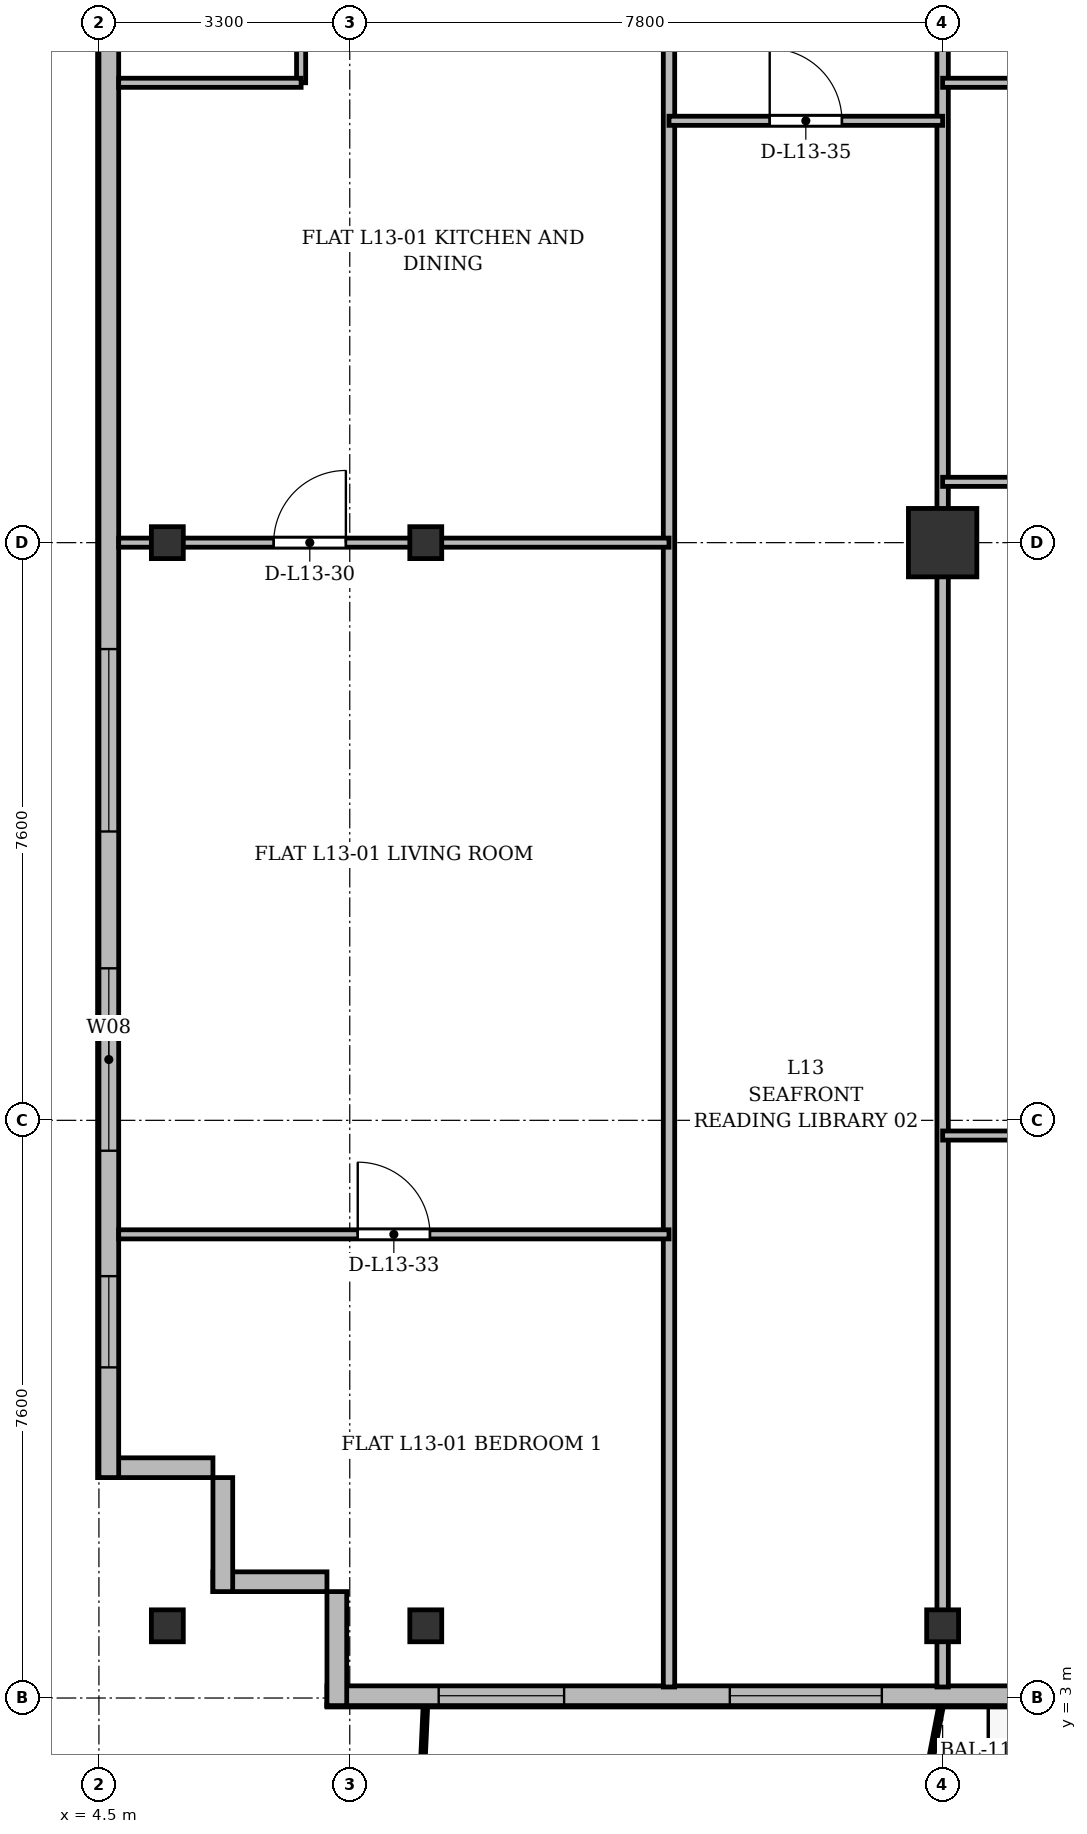
"""IFC4 building model, lengths in metres.
Left out: names, types, materials, properties, quantities, classifications, styles, units other than length and angle.
Written with IfcOpenShell. Run it as: python <this file> out.ifc"""

import sys

from ifc_helpers import new_model, si_unit, direction, frame, frame_2d, origin, origin_2d, place, context, subcontext, project, spatial, rectangle, i_section, extrude, source, transform, mapped, element, fill, save


model = new_model("IFC4")
c1 = context("Model", 3, precision=1e-05, world=origin(), true_north=direction((0.0, 1.0)))
c2 = subcontext(c1, "Body", "Model", "MODEL_VIEW")
j1 = project(units=[si_unit("LENGTHUNIT", "METRE"), si_unit("PLANEANGLEUNIT", "RADIAN")], contexts=[c1])
p1 = place(None, origin())
s1 = spatial("IfcSite", under=j1, at=p1, CompositionType="ELEMENT")
p2 = place(p1, origin())
s2 = spatial("IfcBuilding", under=s1, at=p2, CompositionType="ELEMENT")
p3 = place(p2, frame((0.0, 0.0, 52.3)))
s3 = spatial("IfcBuildingStorey", under=s2, at=p3, CompositionType="ELEMENT", Elevation=52.3)
m1 = source(origin(), c2, "Body", "SweptSolid", [
    extrude(i_section(OverallWidth=0.42, OverallDepth=0.42, WebThickness=0.026, FlangeThickness=0.04, at=origin_2d()), origin(), (0.0, 0.0, 1.0), 3.6),
])
for number, where, z_axis, x_axis in (
    (1, (5.4, 3.95, 0.0), (0.0, 0.0, 1.0), (1.0, 0.0, 0.0)),
    (2, (5.4, 18.2, 0.0), (0.0, 0.0, 1.0), (1.0, 0.0, 0.0)),
    (3, (8.8, 3.95, 0.0), (0.0, 0.0, 1.0), (1.0, 0.0, 0.0)),
    (4, (8.8, 18.2, 0.0), (0.0, 0.0, 1.0), (1.0, 0.0, 0.0)),
    (5, (15.6, 3.95, 0.0), (0.0, 0.0, 1.0), (1.0, 0.0, 0.0)),
):
    element("IfcColumn", number, at=place(p3, frame(where, z_axis=z_axis, x_axis=x_axis)), inside=s3, PredefinedType="COLUMN", context=c2, shape_type="MappedRepresentation", body=[
        mapped(m1, transform((0.0, 0.0, 0.0), x_axis=(1.0, 0.0, 0.0), y_axis=(0.0, 1.0, 0.0), z_axis=(0.0, 0.0, 1.0), scale=1.0)),
    ])
m2 = source(origin(), c2, "Body", "SweptSolid", [
    extrude(rectangle(XDim=0.9, YDim=0.9, at=origin_2d()), origin(), (0.0, 0.0, 1.0), 3.6),
])
p4 = place(p3, frame((15.6, 18.2, 0.0), z_axis=(0.0, 0.0, 1.0), x_axis=(1.0, 0.0, 0.0)))
e6 = element("IfcColumn", 6, at=p4, inside=s3, PredefinedType="COLUMN", context=c2, shape_type="MappedRepresentation", body=[
    mapped(m2, transform((0.0, 0.0, 0.0), x_axis=(1.0, 0.0, 0.0), y_axis=(0.0, 1.0, 0.0), z_axis=(0.0, 0.0, 1.0), scale=1.0)),
])
for number, where, z_axis, x_axis in (
    (7, (7.5, 4.53, 0.0), (0.0, 0.0, 1.0), (-1.0, 0.0, 0.0)),
    (8, (6.13, 4.4, 0.0), (0.0, 0.0, 1.0), (0.0, 1.0, 0.0)),
):
    element("IfcWall", number, at=place(p3, frame(where, z_axis=z_axis, x_axis=x_axis)), inside=s3, PredefinedType="SOLIDWALL", context=c2, shape_type="SweptSolid", body=[
        extrude(rectangle(XDim=1.5, YDim=0.26, at=frame_2d((0.75, 0.0))), origin(), (0.0, 0.0, 1.0), 3.34),
    ])
p5 = place(p3, frame((6.0, 6.03, 0.0), z_axis=(0.0, 0.0, 1.0), x_axis=(-1.0, 0.0, 0.0)))
e9 = element("IfcWall", 9, at=p5, inside=s3, PredefinedType="SOLIDWALL", context=c2, shape_type="SweptSolid", body=[
    extrude(rectangle(XDim=1.5, YDim=0.26, at=frame_2d((0.75, 0.0))), origin(), (0.0, 0.0, 1.0), 2.752),
])
p6 = place(p3, frame((4.63, 5.9, 0.0), z_axis=(0.0, 0.0, 1.0), x_axis=(0.0, 1.0, 0.0)))
e10 = element("IfcWall", 10, at=p6, inside=s3, PredefinedType="SOLIDWALL", context=c2, shape_type="SweptSolid", body=[
    extrude(rectangle(XDim=39.6, YDim=0.26, at=frame_2d((19.8, 0.0))), origin(), (0.0, 0.0, 1.0), 3.34),
])
p7 = place(p6, frame((1.45, 0.0, 0.92)))
e11 = element("IfcOpeningElement", 11, at=p7, cuts=e10, PredefinedType="OPENING", context=c2, shape_type="SweptSolid", body=[
    extrude(rectangle(XDim=1.2, YDim=1.65, at=frame_2d((0.6, 0.825))), frame((0.0, 0.14, 0.0), z_axis=(0.0, -1.0, 0.0), x_axis=(1.0, 0.0, 0.0)), (0.0, 0.0, 1.0), 0.28),
])
p8 = place(p6, frame((4.3, 0.0, 0.92)))
e12 = element("IfcOpeningElement", 12, at=p8, cuts=e10, PredefinedType="OPENING", context=c2, shape_type="SweptSolid", body=[
    extrude(rectangle(XDim=2.4, YDim=2.1, at=frame_2d((1.2, 1.05))), frame((0.0, 0.14, 0.0), z_axis=(0.0, -1.0, 0.0), x_axis=(1.0, 0.0, 0.0)), (0.0, 0.0, 1.0), 0.28),
])
p9 = place(p6, frame((8.5, 0.0, 0.92)))
e13 = element("IfcOpeningElement", 13, at=p9, cuts=e10, PredefinedType="OPENING", context=c2, shape_type="SweptSolid", body=[
    extrude(rectangle(XDim=2.4, YDim=2.1, at=frame_2d((1.2, 1.05))), frame((0.0, 0.14, 0.0), z_axis=(0.0, -1.0, 0.0), x_axis=(1.0, 0.0, 0.0)), (0.0, 0.0, 1.0), 0.28),
])
p10 = place(p6, frame((29.7, 0.0, 0.92)))
e14 = element("IfcOpeningElement", 14, at=p10, cuts=e10, PredefinedType="OPENING", context=c2, shape_type="SweptSolid", body=[
    extrude(rectangle(XDim=2.4, YDim=2.1, at=frame_2d((1.2, 1.05))), frame((0.0, 0.14, 0.0), z_axis=(0.0, -1.0, 0.0), x_axis=(1.0, 0.0, 0.0)), (0.0, 0.0, 1.0), 0.28),
])
p11 = place(p6, frame((33.9, 0.0, 0.92)))
e15 = element("IfcOpeningElement", 15, at=p11, cuts=e10, PredefinedType="OPENING", context=c2, shape_type="SweptSolid", body=[
    extrude(rectangle(XDim=1.2, YDim=1.65, at=frame_2d((0.6, 0.825))), frame((0.0, 0.14, 0.0), z_axis=(0.0, -1.0, 0.0), x_axis=(1.0, 0.0, 0.0)), (0.0, 0.0, 1.0), 0.28),
])
p12 = place(p6, frame((37.25, 0.0, 0.92)))
e16 = element("IfcOpeningElement", 16, at=p12, cuts=e10, PredefinedType="OPENING", context=c2, shape_type="SweptSolid", body=[
    extrude(rectangle(XDim=1.2, YDim=1.65, at=frame_2d((0.6, 0.825))), frame((0.0, 0.14, 0.0), z_axis=(0.0, -1.0, 0.0), x_axis=(1.0, 0.0, 0.0)), (0.0, 0.0, 1.0), 0.28),
])
p13 = place(p3, frame((66.9, 3.03, 0.0), z_axis=(0.0, 0.0, 1.0), x_axis=(-1.0, 0.0, 0.0)))
e17 = element("IfcWall", 17, at=p13, inside=s3, PredefinedType="SOLIDWALL", context=c2, shape_type="SweptSolid", body=[
    extrude(rectangle(XDim=59.4, YDim=0.26, at=frame_2d((29.7, 0.0))), origin(), (0.0, 0.0, 1.0), 3.34),
])
p14 = place(p13, frame((0.495, 0.0, 0.9)))
e18 = element("IfcOpeningElement", 18, at=p14, cuts=e17, PredefinedType="OPENING", context=c2, shape_type="SweptSolid", body=[
    extrude(rectangle(XDim=2.0, YDim=1.95, at=frame_2d((1.0, 0.975))), frame((0.0, 0.14, 0.0), z_axis=(0.0, -1.0, 0.0), x_axis=(1.0, 0.0, 0.0)), (0.0, 0.0, 1.0), 0.28),
])
p15 = place(p13, frame((4.675, 0.0, 0.9)))
e19 = element("IfcOpeningElement", 19, at=p15, cuts=e17, PredefinedType="OPENING", context=c2, shape_type="SweptSolid", body=[
    extrude(rectangle(XDim=1.65, YDim=1.85, at=frame_2d((0.825, 0.925))), frame((0.0, 0.14, 0.0), z_axis=(0.0, -1.0, 0.0), x_axis=(1.0, 0.0, 0.0)), (0.0, 0.0, 1.0), 0.28),
])
p16 = place(p13, frame((11.1, 0.0, 0.9)))
e20 = element("IfcOpeningElement", 20, at=p16, cuts=e17, PredefinedType="OPENING", context=c2, shape_type="SweptSolid", body=[
    extrude(rectangle(XDim=1.8, YDim=1.8, at=frame_2d((0.9, 0.9))), frame((0.0, 0.14, 0.0), z_axis=(0.0, -1.0, 0.0), x_axis=(1.0, 0.0, 0.0)), (0.0, 0.0, 1.0), 0.28),
])
p17 = place(p13, frame((17.007, 0.0, 0.0)))
e21 = element("IfcOpeningElement", 21, at=p17, cuts=e17, PredefinedType="OPENING", context=c2, shape_type="SweptSolid", body=[
    extrude(rectangle(XDim=1.2, YDim=2.2, at=frame_2d((0.6, 1.1))), frame((0.0, 0.14, 0.0), z_axis=(0.0, -1.0, 0.0), x_axis=(1.0, 0.0, 0.0)), (0.0, 0.0, 1.0), 0.28),
])
p18 = place(p13, frame((20.55, 0.0, 0.9)))
e22 = element("IfcOpeningElement", 22, at=p18, cuts=e17, PredefinedType="OPENING", context=c2, shape_type="SweptSolid", body=[
    extrude(rectangle(XDim=1.5, YDim=1.75, at=frame_2d((0.75, 0.875))), frame((0.0, 0.14, 0.0), z_axis=(0.0, -1.0, 0.0), x_axis=(1.0, 0.0, 0.0)), (0.0, 0.0, 1.0), 0.28),
])
p19 = place(p13, frame((24.5, 0.0, 0.9)))
e23 = element("IfcOpeningElement", 23, at=p19, cuts=e17, PredefinedType="OPENING", context=c2, shape_type="SweptSolid", body=[
    extrude(rectangle(XDim=2.0, YDim=1.95, at=frame_2d((1.0, 0.975))), frame((0.0, 0.14, 0.0), z_axis=(0.0, -1.0, 0.0), x_axis=(1.0, 0.0, 0.0)), (0.0, 0.0, 1.0), 0.28),
])
p20 = place(p13, frame((31.275, 0.0, 0.9)))
e24 = element("IfcOpeningElement", 24, at=p20, cuts=e17, PredefinedType="OPENING", context=c2, shape_type="SweptSolid", body=[
    extrude(rectangle(XDim=1.65, YDim=1.85, at=frame_2d((0.825, 0.925))), frame((0.0, 0.14, 0.0), z_axis=(0.0, -1.0, 0.0), x_axis=(1.0, 0.0, 0.0)), (0.0, 0.0, 1.0), 0.28),
])
p21 = place(p13, frame((39.0, 0.0, 0.9)))
e25 = element("IfcOpeningElement", 25, at=p21, cuts=e17, PredefinedType="OPENING", context=c2, shape_type="SweptSolid", body=[
    extrude(rectangle(XDim=1.8, YDim=1.8, at=frame_2d((0.9, 0.9))), frame((0.0, 0.14, 0.0), z_axis=(0.0, -1.0, 0.0), x_axis=(1.0, 0.0, 0.0)), (0.0, 0.0, 1.0), 0.28),
])
p22 = place(p13, frame((45.435, 0.0, 0.0)))
e26 = element("IfcOpeningElement", 26, at=p22, cuts=e17, PredefinedType="OPENING", context=c2, shape_type="SweptSolid", body=[
    extrude(rectangle(XDim=1.2, YDim=2.2, at=frame_2d((0.6, 1.1))), frame((0.0, 0.14, 0.0), z_axis=(0.0, -1.0, 0.0), x_axis=(1.0, 0.0, 0.0)), (0.0, 0.0, 1.0), 0.28),
])
p23 = place(p13, frame((48.6, 0.0, 0.9)))
e27 = element("IfcOpeningElement", 27, at=p23, cuts=e17, PredefinedType="OPENING", context=c2, shape_type="SweptSolid", body=[
    extrude(rectangle(XDim=1.5, YDim=1.75, at=frame_2d((0.75, 0.875))), frame((0.0, 0.14, 0.0), z_axis=(0.0, -1.0, 0.0), x_axis=(1.0, 0.0, 0.0)), (0.0, 0.0, 1.0), 0.28),
])
p24 = place(p13, frame((52.1, 0.0, 0.9)))
e28 = element("IfcOpeningElement", 28, at=p24, cuts=e17, PredefinedType="OPENING", context=c2, shape_type="SweptSolid", body=[
    extrude(rectangle(XDim=2.0, YDim=1.95, at=frame_2d((1.0, 0.975))), frame((0.0, 0.14, 0.0), z_axis=(0.0, -1.0, 0.0), x_axis=(1.0, 0.0, 0.0)), (0.0, 0.0, 1.0), 0.28),
])
p25 = place(p13, frame((56.28, 0.0, 0.9)))
e29 = element("IfcOpeningElement", 29, at=p25, cuts=e17, PredefinedType="OPENING", context=c2, shape_type="SweptSolid", body=[
    extrude(rectangle(XDim=1.65, YDim=1.85, at=frame_2d((0.825, 0.925))), frame((0.0, 0.14, 0.0), z_axis=(0.0, -1.0, 0.0), x_axis=(1.0, 0.0, 0.0)), (0.0, 0.0, 1.0), 0.28),
])
p26 = place(p3, frame((7.63, 2.9, 0.0), z_axis=(0.0, 0.0, 1.0), x_axis=(0.0, 1.0, 0.0)))
e30 = element("IfcWall", 30, at=p26, inside=s3, PredefinedType="SOLIDWALL", context=c2, shape_type="SweptSolid", body=[
    extrude(rectangle(XDim=1.5, YDim=0.26, at=frame_2d((0.75, 0.0))), origin(), (0.0, 0.0, 1.0), 2.69),
])
p27 = place(p3, frame((12.0, 3.145, 0.0), z_axis=(0.0, 0.0, 1.0), x_axis=(0.0, 1.0, 0.0)))
e31 = element("IfcWall", 31, at=p27, inside=s3, PredefinedType="PARTITIONING", context=c2, shape_type="SweptSolid", body=[
    extrude(rectangle(XDim=24.455, YDim=0.15, at=frame_2d((12.228, 0.0))), origin(), (0.0, 0.0, 1.0), 2.69),
])
p28 = place(p3, frame((15.6, 3.145, 0.0), z_axis=(0.0, 0.0, 1.0), x_axis=(0.0, 1.0, 0.0)))
e32 = element("IfcWall", 32, at=p28, inside=s3, PredefinedType="PARTITIONING", context=c2, shape_type="SweptSolid", body=[
    extrude(rectangle(XDim=24.455, YDim=0.15, at=frame_2d((12.228, 0.0))), origin(), (0.0, 0.0, 1.0), 2.752),
])
p29 = place(p3, frame((4.76, 18.2, 0.0), z_axis=(0.0, 0.0, 1.0), x_axis=(1.0, 0.0, 0.0)))
e33 = element("IfcWall", 33, at=p29, inside=s3, PredefinedType="PARTITIONING", context=c2, shape_type="SweptSolid", body=[
    extrude(rectangle(XDim=7.24, YDim=0.12, at=frame_2d((3.62, 0.0))), origin(), (0.0, 0.0, 1.0), 2.69),
])
p30 = place(p29, frame((2.039, 0.0, 0.0)))
e34 = element("IfcOpeningElement", 34, at=p30, cuts=e33, PredefinedType="OPENING", context=c2, shape_type="SweptSolid", body=[
    extrude(rectangle(XDim=0.95, YDim=2.15, at=frame_2d((0.475, 1.075))), frame((0.0, 0.07, 0.0), z_axis=(0.0, -1.0, 0.0), x_axis=(1.0, 0.0, 0.0)), (0.0, 0.0, 1.0), 0.14),
])
p31 = place(p3, frame((7.16, 24.25, 0.0), z_axis=(0.0, 0.0, 1.0), x_axis=(0.0, 1.0, 0.0)))
e35 = element("IfcWall", 35, at=p31, inside=s3, PredefinedType="PARTITIONING", context=c2, shape_type="SweptSolid", body=[
    extrude(rectangle(XDim=3.35, YDim=0.12, at=frame_2d((1.675, 0.0))), origin(), (0.0, 0.0, 1.0), 2.94),
])
p32 = place(p31, frame((0.8, 0.0, 0.0)))
e36 = element("IfcOpeningElement", 36, at=p32, cuts=e35, PredefinedType="OPENING", context=c2, shape_type="SweptSolid", body=[
    extrude(rectangle(XDim=0.85, YDim=2.1, at=frame_2d((0.425, 1.05))), frame((0.0, 0.07, 0.0), z_axis=(0.0, -1.0, 0.0), x_axis=(1.0, 0.0, 0.0)), (0.0, 0.0, 1.0), 0.14),
])
p33 = place(p3, frame((4.76, 24.25, 0.0), z_axis=(0.0, 0.0, 1.0), x_axis=(1.0, 0.0, 0.0)))
e37 = element("IfcWall", 37, at=p33, inside=s3, PredefinedType="PARTITIONING", context=c2, shape_type="SweptSolid", body=[
    extrude(rectangle(XDim=2.4, YDim=0.12, at=frame_2d((1.2, 0.0))), origin(), (0.0, 0.0, 1.0), 2.752),
])
p34 = place(p3, frame((4.76, 9.1, 0.0), z_axis=(0.0, 0.0, 1.0), x_axis=(1.0, 0.0, 0.0)))
e38 = element("IfcWall", 38, at=p34, inside=s3, PredefinedType="PARTITIONING", context=c2, shape_type="SweptSolid", body=[
    extrude(rectangle(XDim=7.24, YDim=0.12, at=frame_2d((3.62, 0.0))), origin(), (0.0, 0.0, 1.0), 2.752),
])
p35 = place(p34, frame((3.145, 0.0, 0.0)))
e39 = element("IfcOpeningElement", 39, at=p35, cuts=e38, PredefinedType="OPENING", context=c2, shape_type="SweptSolid", body=[
    extrude(rectangle(XDim=0.95, YDim=2.15, at=frame_2d((0.475, 1.075))), frame((0.0, 0.07, 0.0), z_axis=(0.0, -1.0, 0.0), x_axis=(1.0, 0.0, 0.0)), (0.0, 0.0, 1.0), 0.14),
])
p36 = place(p3, frame((12.0, 23.75, 0.0), z_axis=(0.0, 0.0, 1.0), x_axis=(1.0, 0.0, 0.0)))
e40 = element("IfcWall", 40, at=p36, inside=s3, PredefinedType="PARTITIONING", context=c2, shape_type="SweptSolid", body=[
    extrude(rectangle(XDim=3.6, YDim=0.12, at=frame_2d((1.8, 0.0))), origin(), (0.0, 0.0, 1.0), 2.752),
])
p37 = place(p36, frame((1.325, 0.0, 0.0)))
e41 = element("IfcOpeningElement", 41, at=p37, cuts=e40, PredefinedType="OPENING", context=c2, shape_type="SweptSolid", body=[
    extrude(rectangle(XDim=0.95, YDim=2.15, at=frame_2d((0.475, 1.075))), frame((0.0, 0.07, 0.0), z_axis=(0.0, -1.0, 0.0), x_axis=(1.0, 0.0, 0.0)), (0.0, 0.0, 1.0), 0.14),
])
p38 = place(p3, frame((15.6, 19.0, 0.0), z_axis=(0.0, 0.0, 1.0), x_axis=(1.0, 0.0, 0.0)))
e42 = element("IfcWall", 42, at=p38, inside=s3, PredefinedType="PARTITIONING", context=c2, shape_type="SweptSolid", body=[
    extrude(rectangle(XDim=7.8, YDim=0.12, at=frame_2d((3.9, 0.0))), origin(), (0.0, 0.0, 1.0), 2.752),
])
p39 = place(p38, frame((3.333, 0.0, 0.0)))
e43 = element("IfcOpeningElement", 43, at=p39, cuts=e42, PredefinedType="OPENING", context=c2, shape_type="SweptSolid", body=[
    extrude(rectangle(XDim=0.95, YDim=2.15, at=frame_2d((0.475, 1.075))), frame((0.0, 0.07, 0.0), z_axis=(0.0, -1.0, 0.0), x_axis=(1.0, 0.0, 0.0)), (0.0, 0.0, 1.0), 0.14),
])
p40 = place(p3, frame((15.6, 24.25, 0.0), z_axis=(0.0, 0.0, 1.0), x_axis=(1.0, 0.0, 0.0)))
e44 = element("IfcWall", 44, at=p40, inside=s3, PredefinedType="PARTITIONING", context=c2, shape_type="SweptSolid", body=[
    extrude(rectangle(XDim=2.4, YDim=0.12, at=frame_2d((1.2, 0.0))), origin(), (0.0, 0.0, 1.0), 2.752),
])
p41 = place(p3, frame((15.6, 10.4, 0.0), z_axis=(0.0, 0.0, 1.0), x_axis=(1.0, 0.0, 0.0)))
e45 = element("IfcWall", 45, at=p41, inside=s3, PredefinedType="PARTITIONING", context=c2, shape_type="SweptSolid", body=[
    extrude(rectangle(XDim=3.9, YDim=0.12, at=frame_2d((1.95, 0.0))), origin(), (0.0, 0.0, 1.0), 2.752),
])
p42 = place(p41, frame((1.475, 0.0, 0.0)))
e46 = element("IfcOpeningElement", 46, at=p42, cuts=e45, PredefinedType="OPENING", context=c2, shape_type="SweptSolid", body=[
    extrude(rectangle(XDim=0.95, YDim=2.15, at=frame_2d((0.475, 1.075))), frame((0.0, 0.07, 0.0), z_axis=(0.0, -1.0, 0.0), x_axis=(1.0, 0.0, 0.0)), (0.0, 0.0, 1.0), 0.14),
])
m3 = source(origin(), c2, "Body", "SweptSolid", [
    extrude(rectangle(XDim=1.2, YDim=1.65, at=frame_2d((0.6, 0.825))), frame((0.0, 0.03, 0.0), z_axis=(0.0, -1.0, 0.0), x_axis=(1.0, 0.0, 0.0)), (0.0, 0.0, 1.0), 0.06),
])
p43 = place(p7, origin())
e47 = element("IfcWindow", 47, at=p43, inside=s3, PartitioningType="SINGLE_PANEL", PredefinedType="WINDOW", context=c2, shape_type="MappedRepresentation", body=[
    mapped(m3, transform((0.0, 0.0, 0.0), x_axis=(1.0, 0.0, 0.0), y_axis=(0.0, 1.0, 0.0), z_axis=(0.0, 0.0, 1.0), scale=1.0)),
])
fill(e11, e47)
m4 = source(origin(), c2, "Body", "SweptSolid", [
    extrude(rectangle(XDim=2.4, YDim=2.1, at=frame_2d((1.2, 1.05))), frame((0.0, 0.03, 0.0), z_axis=(0.0, -1.0, 0.0), x_axis=(1.0, 0.0, 0.0)), (0.0, 0.0, 1.0), 0.06),
])
p44 = place(p8, origin())
e48 = element("IfcWindow", 48, at=p44, inside=s3, PartitioningType="SINGLE_PANEL", PredefinedType="WINDOW", context=c2, shape_type="MappedRepresentation", body=[
    mapped(m4, transform((0.0, 0.0, 0.0), x_axis=(1.0, 0.0, 0.0), y_axis=(0.0, 1.0, 0.0), z_axis=(0.0, 0.0, 1.0), scale=1.0)),
])
fill(e12, e48)
p45 = place(p9, origin())
e49 = element("IfcWindow", 49, at=p45, inside=s3, PartitioningType="SINGLE_PANEL", PredefinedType="WINDOW", context=c2, shape_type="MappedRepresentation", body=[
    mapped(m4, transform((0.0, 0.0, 0.0), x_axis=(1.0, 0.0, 0.0), y_axis=(0.0, 1.0, 0.0), z_axis=(0.0, 0.0, 1.0), scale=1.0)),
])
fill(e13, e49)
m5 = source(origin(), c2, "Body", "SweptSolid", [
    extrude(rectangle(XDim=2.0, YDim=1.95, at=frame_2d((1.0, 0.975))), frame((0.0, 0.03, 0.0), z_axis=(0.0, -1.0, 0.0), x_axis=(1.0, 0.0, 0.0)), (0.0, 0.0, 1.0), 0.06),
])
p46 = place(p24, origin())
e50 = element("IfcWindow", 50, at=p46, inside=s3, PartitioningType="SINGLE_PANEL", PredefinedType="WINDOW", context=c2, shape_type="MappedRepresentation", body=[
    mapped(m5, transform((0.0, 0.0, 0.0), x_axis=(1.0, 0.0, 0.0), y_axis=(0.0, 1.0, 0.0), z_axis=(0.0, 0.0, 1.0), scale=1.0)),
])
fill(e28, e50)
m6 = source(origin(), c2, "Body", "SweptSolid", [
    extrude(rectangle(XDim=1.65, YDim=1.85, at=frame_2d((0.825, 0.925))), frame((0.0, 0.03, 0.0), z_axis=(0.0, -1.0, 0.0), x_axis=(1.0, 0.0, 0.0)), (0.0, 0.0, 1.0), 0.06),
])
p47 = place(p25, origin())
e51 = element("IfcWindow", 51, at=p47, inside=s3, PartitioningType="SINGLE_PANEL", PredefinedType="WINDOW", context=c2, shape_type="MappedRepresentation", body=[
    mapped(m6, transform((0.0, 0.0, 0.0), x_axis=(1.0, 0.0, 0.0), y_axis=(0.0, 1.0, 0.0), z_axis=(0.0, 0.0, 1.0), scale=1.0)),
])
fill(e29, e51)
m7 = source(origin(), c2, "Body", "SweptSolid", [
    extrude(rectangle(XDim=0.95, YDim=2.15, at=frame_2d((0.475, 1.075))), frame((0.0, 0.025, 0.0), z_axis=(0.0, -1.0, 0.0), x_axis=(1.0, 0.0, 0.0)), (0.0, 0.0, 1.0), 0.05),
])
p48 = place(p30, origin())
e52 = element("IfcDoor", 52, at=p48, inside=s3, OperationType="SINGLE_SWING_RIGHT", PredefinedType="DOOR", context=c2, shape_type="MappedRepresentation", body=[
    mapped(m7, transform((0.0, 0.0, 0.0), x_axis=(1.0, 0.0, 0.0), y_axis=(0.0, 1.0, 0.0), z_axis=(0.0, 0.0, 1.0), scale=1.0)),
])
fill(e34, e52)
p49 = place(p35, origin())
e53 = element("IfcDoor", 53, at=p49, inside=s3, OperationType="SINGLE_SWING_LEFT", PredefinedType="DOOR", context=c2, shape_type="MappedRepresentation", body=[
    mapped(m7, transform((0.0, 0.0, 0.0), x_axis=(1.0, 0.0, 0.0), y_axis=(0.0, 1.0, 0.0), z_axis=(0.0, 0.0, 1.0), scale=1.0)),
])
fill(e39, e53)
p50 = place(p37, origin())
e54 = element("IfcDoor", 54, at=p50, inside=s3, OperationType="SINGLE_SWING_LEFT", PredefinedType="DOOR", context=c2, shape_type="MappedRepresentation", body=[
    mapped(m7, transform((0.0, 0.0, 0.0), x_axis=(1.0, 0.0, 0.0), y_axis=(0.0, 1.0, 0.0), z_axis=(0.0, 0.0, 1.0), scale=1.0)),
])
fill(e41, e54)
save(model, sys.argv[1])
